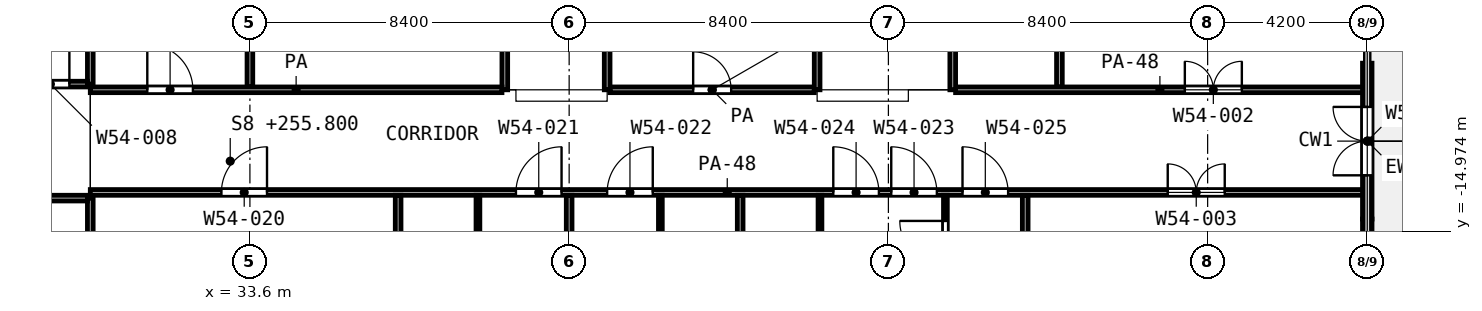
"""IFC4 building model, lengths in metres.
Left out: names, types, materials, properties, quantities, classifications, styles, units other than length and angle.
Written with IfcOpenShell. Run it as: python <this file> out.ifc"""

import sys

from ifc_helpers import new_model, si_unit, direction, frame, frame_2d, origin, place, context, subcontext, project, spatial, rectangle, extrude, element, fill, save


model = new_model("IFC4")
c1 = context("Model", 3, precision=1e-05, world=origin(), true_north=direction((0.0, 1.0)))
c2 = subcontext(c1, "Body", "Model", "MODEL_VIEW")
j1 = project(units=[si_unit("LENGTHUNIT", "METRE"), si_unit("PLANEANGLEUNIT", "RADIAN")], contexts=[c1])
p1 = place(None, origin())
s1 = spatial("IfcSite", under=j1, at=p1, CompositionType="ELEMENT")
p2 = place(p1, origin())
s2 = spatial("IfcBuilding", under=s1, at=p2, CompositionType="ELEMENT")
p3 = place(p2, frame((0.0, 0.0, 255.8)))
s3 = spatial("IfcBuildingStorey", under=s2, at=p3, CompositionType="ELEMENT", Elevation=255.8)
p4 = place(p3, frame((63.0, -18.75, 0.0), z_axis=(0.0, 0.0, 1.0), x_axis=(0.0, 1.0, 0.0)))
e1 = element("IfcWall", 1, at=p4, inside=s3, PredefinedType="SOLIDWALL", context=c2, shape_type="SweptSolid", body=[
    extrude(rectangle(XDim=4.1, YDim=0.25, at=frame_2d((2.05, 0.0))), origin(), (0.0, 0.0, 1.0), 2.58),
])
p5 = place(p4, frame((1.15, 0.0, 0.0)))
e2 = element("IfcOpeningElement", 2, at=p5, cuts=e1, PredefinedType="OPENING", context=c2, shape_type="SweptSolid", body=[
    extrude(rectangle(XDim=1.8, YDim=2.1, at=frame_2d((0.9, 1.05))), frame((0.0, 0.135, 0.0), z_axis=(0.0, -1.0, 0.0), x_axis=(1.0, 0.0, 0.0)), (0.0, 0.0, 1.0), 0.27),
])
p6 = place(p3, frame((63.0, -14.65, 0.0), z_axis=(0.0, 0.0, 1.0), x_axis=(0.0, 1.0, 0.0)))
e3 = element("IfcWall", 3, at=p6, inside=s3, PredefinedType="SOLIDWALL", context=c2, shape_type="SweptSolid", body=[
    extrude(rectangle(XDim=4.1, YDim=0.25, at=frame_2d((2.05, 0.0))), origin(), (0.0, 0.0, 1.0), 2.58),
])
p7 = place(p6, frame((1.15, 0.0, 0.0)))
e4 = element("IfcOpeningElement", 4, at=p7, cuts=e3, PredefinedType="OPENING", context=c2, shape_type="SweptSolid", body=[
    extrude(rectangle(XDim=1.8, YDim=2.1, at=frame_2d((0.9, 1.05))), frame((0.0, 0.135, 0.0), z_axis=(0.0, -1.0, 0.0), x_axis=(1.0, 0.0, 0.0)), (0.0, 0.0, 1.0), 0.27),
])
for number, where, z_axis, x_axis in (
    (5, (39.6, -16.65, 0.0), (0.0, 0.0, 1.0), (0.0, 1.0, 0.0)),
    (6, (44.4, -16.65, 0.0), (0.0, 0.0, 1.0), (0.0, 1.0, 0.0)),
    (7, (48.6, -16.65, 0.0), (0.0, 0.0, 1.0), (0.0, 1.0, 0.0)),
):
    element("IfcWall", number, at=place(p3, frame(where, z_axis=z_axis, x_axis=x_axis)), inside=s3, PredefinedType="PARTITIONING", context=c2, shape_type="SweptSolid", body=[
        extrude(rectangle(XDim=2.625, YDim=0.1, at=frame_2d((1.312, 0.0))), origin(), (0.0, 0.0, 1.0), 3.6),
    ])
p8 = place(p3, frame((51.9, -16.65, 0.0), z_axis=(0.0, 0.0, 1.0), x_axis=(0.0, 1.0, 0.0)))
e8 = element("IfcWall", 8, at=p8, inside=s3, PredefinedType="PARTITIONING", context=c2, shape_type="SweptSolid", body=[
    extrude(rectangle(XDim=2.625, YDim=0.1, at=frame_2d((1.312, 0.0))), origin(), (0.0, 0.0, 1.0), 3.6),
])
p9 = place(p8, frame((0.75, 0.0, 0.0)))
e9 = element("IfcOpeningElement", 9, at=p9, cuts=e8, PredefinedType="OPENING", context=c2, shape_type="SweptSolid", body=[
    extrude(rectangle(XDim=1.2, YDim=2.1, at=frame_2d((0.6, 1.05))), frame((0.0, 0.06, 0.0), z_axis=(0.0, -1.0, 0.0), x_axis=(1.0, 0.0, 0.0)), (0.0, 0.0, 1.0), 0.12),
])
p10 = place(p3, frame((24.8, -14.1, 0.0), z_axis=(0.0, 0.0, 1.0), x_axis=(1.0, 0.0, 0.0)))
e10 = element("IfcWall", 10, at=p10, inside=s3, PredefinedType="PARTITIONING", context=c2, shape_type="SweptSolid", body=[
    extrude(rectangle(XDim=4.525, YDim=0.15, at=frame_2d((2.262, 0.0))), origin(), (0.0, 0.0, 1.0), 3.6),
])
p11 = place(p10, frame((1.75, 0.0, 0.0)))
e11 = element("IfcOpeningElement", 11, at=p11, cuts=e10, PredefinedType="OPENING", context=c2, shape_type="SweptSolid", body=[
    extrude(rectangle(XDim=1.5, YDim=2.1, at=frame_2d((0.75, 1.05))), frame((0.0, 0.085, 0.0), z_axis=(0.0, -1.0, 0.0), x_axis=(1.0, 0.0, 0.0)), (0.0, 0.0, 1.0), 0.17),
])
p12 = place(p3, frame((29.4, -13.95, 0.0), z_axis=(0.0, 0.0, 1.0), x_axis=(1.0, 0.0, 0.0)))
e12 = element("IfcWall", 12, at=p12, inside=s3, PredefinedType="PARTITIONING", context=c2, shape_type="SweptSolid", body=[
    extrude(rectangle(XDim=33.52, YDim=0.15, at=frame_2d((16.76, 0.0))), origin(), (0.0, 0.0, 1.0), 2.7),
])
p13 = place(p12, frame((3.45, 0.0, 0.0)))
e13 = element("IfcOpeningElement", 13, at=p13, cuts=e12, PredefinedType="OPENING", context=c2, shape_type="SweptSolid", body=[
    extrude(rectangle(XDim=1.2, YDim=2.1, at=frame_2d((0.6, 1.05))), frame((0.0, 0.085, 0.0), z_axis=(0.0, -1.0, 0.0), x_axis=(1.0, 0.0, 0.0)), (0.0, 0.0, 1.0), 0.17),
])
p14 = place(p12, frame((11.2, 0.0, 0.0)))
e14 = element("IfcOpeningElement", 14, at=p14, cuts=e12, PredefinedType="OPENING", context=c2, shape_type="SweptSolid", body=[
    extrude(rectangle(XDim=1.2, YDim=2.1, at=frame_2d((0.6, 1.05))), frame((0.0, 0.085, 0.0), z_axis=(0.0, -1.0, 0.0), x_axis=(1.0, 0.0, 0.0)), (0.0, 0.0, 1.0), 0.17),
])
p15 = place(p12, frame((13.6, 0.0, 0.0)))
e15 = element("IfcOpeningElement", 15, at=p15, cuts=e12, PredefinedType="OPENING", context=c2, shape_type="SweptSolid", body=[
    extrude(rectangle(XDim=1.2, YDim=2.1, at=frame_2d((0.6, 1.05))), frame((0.0, 0.085, 0.0), z_axis=(0.0, -1.0, 0.0), x_axis=(1.0, 0.0, 0.0)), (0.0, 0.0, 1.0), 0.17),
])
p16 = place(p12, frame((21.075, 0.0, 0.0)))
e16 = element("IfcOpeningElement", 16, at=p16, cuts=e12, PredefinedType="OPENING", context=c2, shape_type="SweptSolid", body=[
    extrude(rectangle(XDim=1.2, YDim=2.1, at=frame_2d((0.6, 1.05))), frame((0.0, 0.085, 0.0), z_axis=(0.0, -1.0, 0.0), x_axis=(1.0, 0.0, 0.0)), (0.0, 0.0, 1.0), 0.17),
])
p17 = place(p12, frame((19.55, 0.0, 0.0)))
e17 = element("IfcOpeningElement", 17, at=p17, cuts=e12, PredefinedType="OPENING", context=c2, shape_type="SweptSolid", body=[
    extrude(rectangle(XDim=1.2, YDim=2.1, at=frame_2d((0.6, 1.05))), frame((0.0, 0.085, 0.0), z_axis=(0.0, -1.0, 0.0), x_axis=(1.0, 0.0, 0.0)), (0.0, 0.0, 1.0), 0.17),
])
p18 = place(p12, frame((22.95, 0.0, 0.0)))
e18 = element("IfcOpeningElement", 18, at=p18, cuts=e12, PredefinedType="OPENING", context=c2, shape_type="SweptSolid", body=[
    extrude(rectangle(XDim=1.2, YDim=2.1, at=frame_2d((0.6, 1.05))), frame((0.0, 0.085, 0.0), z_axis=(0.0, -1.0, 0.0), x_axis=(1.0, 0.0, 0.0)), (0.0, 0.0, 1.0), 0.17),
])
p19 = place(p12, frame((28.35, 0.0, 0.0)))
e19 = element("IfcOpeningElement", 19, at=p19, cuts=e12, PredefinedType="OPENING", context=c2, shape_type="SweptSolid", body=[
    extrude(rectangle(XDim=1.5, YDim=2.1, at=frame_2d((0.75, 1.05))), frame((0.0, 0.085, 0.0), z_axis=(0.0, -1.0, 0.0), x_axis=(1.0, 0.0, 0.0)), (0.0, 0.0, 1.0), 0.17),
])
p20 = place(p3, frame((29.4, -11.25, 0.0), z_axis=(0.0, 0.0, 1.0), x_axis=(1.0, 0.0, 0.0)))
e20 = element("IfcWall", 20, at=p20, inside=s3, PredefinedType="PARTITIONING", context=c2, shape_type="SweptSolid", body=[
    extrude(rectangle(XDim=10.832, YDim=0.15, at=frame_2d((5.416, 0.0))), origin(), (0.0, 0.0, 1.0), 3.6),
])
p21 = place(p20, frame((1.5, 0.0, 0.0)))
e21 = element("IfcOpeningElement", 21, at=p21, cuts=e20, PredefinedType="OPENING", context=c2, shape_type="SweptSolid", body=[
    extrude(rectangle(XDim=1.2, YDim=2.1, at=frame_2d((0.6, 1.05))), frame((0.0, 0.085, 0.0), z_axis=(0.0, -1.0, 0.0), x_axis=(1.0, 0.0, 0.0)), (0.0, 0.0, 1.0), 0.17),
])
p22 = place(p3, frame((43.075, -11.25, 0.0), z_axis=(0.0, 0.0, 1.0), x_axis=(1.0, 0.0, 0.0)))
e22 = element("IfcWall", 22, at=p22, inside=s3, PredefinedType="PARTITIONING", context=c2, shape_type="SweptSolid", body=[
    extrude(rectangle(XDim=5.375, YDim=0.15, at=frame_2d((2.688, 0.0))), origin(), (0.0, 0.0, 1.0), 3.6),
])
p23 = place(p22, frame((2.188, 0.0, 0.0)))
e23 = element("IfcOpeningElement", 23, at=p23, cuts=e22, PredefinedType="OPENING", context=c2, shape_type="SweptSolid", body=[
    extrude(rectangle(XDim=1.0, YDim=2.1, at=frame_2d((0.5, 1.05))), frame((0.0, 0.085, 0.0), z_axis=(0.0, -1.0, 0.0), x_axis=(1.0, 0.0, 0.0)), (0.0, 0.0, 1.0), 0.17),
])
p24 = place(p3, frame((52.168, -11.25, 0.0), z_axis=(0.0, 0.0, 1.0), x_axis=(1.0, 0.0, 0.0)))
e24 = element("IfcWall", 24, at=p24, inside=s3, PredefinedType="PARTITIONING", context=c2, shape_type="SweptSolid", body=[
    extrude(rectangle(XDim=10.752, YDim=0.15, at=frame_2d((5.376, 0.0))), origin(), (0.0, 0.0, 1.0), 2.7),
])
p25 = place(p24, frame((6.032, 0.0, 0.0)))
e25 = element("IfcOpeningElement", 25, at=p25, cuts=e24, PredefinedType="OPENING", context=c2, shape_type="SweptSolid", body=[
    extrude(rectangle(XDim=1.5, YDim=2.1, at=frame_2d((0.75, 1.05))), frame((0.0, 0.085, 0.0), z_axis=(0.0, -1.0, 0.0), x_axis=(1.0, 0.0, 0.0)), (0.0, 0.0, 1.0), 0.17),
])
p26 = place(p3, frame((24.8, -11.1, 0.0), z_axis=(0.0, 0.0, 1.0), x_axis=(1.0, 0.0, 0.0)))
e26 = element("IfcWall", 26, at=p26, inside=s3, PredefinedType="PARTITIONING", context=c2, shape_type="SweptSolid", body=[
    extrude(rectangle(XDim=4.525, YDim=0.15, at=frame_2d((2.262, 0.0))), origin(), (0.0, 0.0, 1.0), 3.6),
])
p27 = place(p26, frame((1.0, 0.0, 0.0)))
e27 = element("IfcOpeningElement", 27, at=p27, cuts=e26, PredefinedType="OPENING", context=c2, shape_type="SweptSolid", body=[
    extrude(rectangle(XDim=0.9, YDim=2.1, at=frame_2d((0.45, 1.05))), frame((0.0, 0.085, 0.0), z_axis=(0.0, -1.0, 0.0), x_axis=(1.0, 0.0, 0.0)), (0.0, 0.0, 1.0), 0.17),
])
p28 = place(p26, frame((3.05, 0.0, 0.0)))
e28 = element("IfcOpeningElement", 28, at=p28, cuts=e26, PredefinedType="OPENING", context=c2, shape_type="SweptSolid", body=[
    extrude(rectangle(XDim=1.0, YDim=2.1, at=frame_2d((0.5, 1.05))), frame((0.0, 0.085, 0.0), z_axis=(0.0, -1.0, 0.0), x_axis=(1.0, 0.0, 0.0)), (0.0, 0.0, 1.0), 0.17),
])
p29 = place(p3, frame((29.4, -25.2, 0.0), z_axis=(0.0, 0.0, 1.0), x_axis=(0.0, 1.0, 0.0)))
e29 = element("IfcWall", 29, at=p29, inside=s3, PredefinedType="PARTITIONING", context=c2, shape_type="SweptSolid", body=[
    extrude(rectangle(XDim=11.1, YDim=0.15, at=frame_2d((5.55, 0.0))), origin(), (0.0, 0.0, 1.0), 3.6),
])
p30 = place(p3, frame((29.4, -11.1, 0.0), z_axis=(0.0, 0.0, 1.0), x_axis=(0.0, 1.0, 0.0)))
e30 = element("IfcWall", 30, at=p30, inside=s3, PredefinedType="PARTITIONING", context=c2, shape_type="SweptSolid", body=[
    extrude(rectangle(XDim=11.02, YDim=0.15, at=frame_2d((5.51, 0.0))), origin(), (0.0, 0.0, 1.0), 3.6),
])
p31 = place(p3, frame((33.6, -11.175, 0.0), z_axis=(0.0, 0.0, 1.0), x_axis=(0.0, 1.0, 0.0)))
e31 = element("IfcWall", 31, at=p31, inside=s3, PredefinedType="PARTITIONING", context=c2, shape_type="SweptSolid", body=[
    extrude(rectangle(XDim=11.095, YDim=0.15, at=frame_2d((5.547, 0.0))), origin(), (0.0, 0.0, 1.0), 3.6),
])
p32 = place(p3, frame((37.5, -25.12, 0.0), z_axis=(0.0, 0.0, 1.0), x_axis=(0.0, 1.0, 0.0)))
e32 = element("IfcWall", 32, at=p32, inside=s3, PredefinedType="PARTITIONING", context=c2, shape_type="SweptSolid", body=[
    extrude(rectangle(XDim=11.095, YDim=0.15, at=frame_2d((5.548, 0.0))), origin(), (0.0, 0.0, 1.0), 3.6),
])
p33 = place(p3, frame((40.307, -11.25, 0.0), z_axis=(0.0, 0.0, 1.0), x_axis=(0.0, 1.0, 0.0)))
e33 = element("IfcWall", 33, at=p33, inside=s3, PredefinedType="PARTITIONING", context=c2, shape_type="SweptSolid", body=[
    extrude(rectangle(XDim=11.17, YDim=0.15, at=frame_2d((5.585, 0.0))), origin(), (0.0, 0.0, 1.0), 3.6),
])
p34 = place(p33, frame((4.95, 0.0, 0.0)))
e34 = element("IfcOpeningElement", 34, at=p34, cuts=e33, PredefinedType="OPENING", context=c2, shape_type="SweptSolid", body=[
    extrude(rectangle(XDim=1.0, YDim=2.1, at=frame_2d((0.5, 1.05))), frame((0.0, 0.085, 0.0), z_axis=(0.0, -1.0, 0.0), x_axis=(1.0, 0.0, 0.0)), (0.0, 0.0, 1.0), 0.17),
])
p35 = place(p3, frame((42.0, -25.12, 0.0), z_axis=(0.0, 0.0, 1.0), x_axis=(0.0, 1.0, 0.0)))
e35 = element("IfcWall", 35, at=p35, inside=s3, PredefinedType="PARTITIONING", context=c2, shape_type="SweptSolid", body=[
    extrude(rectangle(XDim=11.095, YDim=0.15, at=frame_2d((5.548, 0.0))), origin(), (0.0, 0.0, 1.0), 3.6),
])
p36 = place(p3, frame((43.0, -11.25, 0.0), z_axis=(0.0, 0.0, 1.0), x_axis=(0.0, 1.0, 0.0)))
e36 = element("IfcWall", 36, at=p36, inside=s3, PredefinedType="PARTITIONING", context=c2, shape_type="SweptSolid", body=[
    extrude(rectangle(XDim=2.398, YDim=0.15, at=frame_2d((1.199, 0.0))), origin(), (0.0, 0.0, 1.0), 3.6),
])
p37 = place(p3, frame((46.5, -25.12, 0.0), z_axis=(0.0, 0.0, 1.0), x_axis=(0.0, 1.0, 0.0)))
e37 = element("IfcWall", 37, at=p37, inside=s3, PredefinedType="PARTITIONING", context=c2, shape_type="SweptSolid", body=[
    extrude(rectangle(XDim=11.095, YDim=0.15, at=frame_2d((5.548, 0.0))), origin(), (0.0, 0.0, 1.0), 3.6),
])
p38 = place(p3, frame((48.525, -11.25, 0.0), z_axis=(0.0, 0.0, 1.0), x_axis=(0.0, 1.0, 0.0)))
e38 = element("IfcWall", 38, at=p38, inside=s3, PredefinedType="PARTITIONING", context=c2, shape_type="SweptSolid", body=[
    extrude(rectangle(XDim=2.6, YDim=0.15, at=frame_2d((1.3, 0.0))), origin(), (0.0, 0.0, 1.0), 3.6),
])
p39 = place(p3, frame((52.093, -11.25, 0.0), z_axis=(0.0, 0.0, 1.0), x_axis=(0.0, 1.0, 0.0)))
e39 = element("IfcWall", 39, at=p39, inside=s3, PredefinedType="PARTITIONING", context=c2, shape_type="SweptSolid", body=[
    extrude(rectangle(XDim=9.398, YDim=0.15, at=frame_2d((4.699, 0.0))), origin(), (0.0, 0.0, 1.0), 3.6),
])
p40 = place(p39, frame((4.199, 0.0, 0.0)))
e40 = element("IfcOpeningElement", 40, at=p40, cuts=e39, PredefinedType="OPENING", context=c2, shape_type="SweptSolid", body=[
    extrude(rectangle(XDim=1.0, YDim=2.1, at=frame_2d((0.5, 1.05))), frame((0.0, 0.085, 0.0), z_axis=(0.0, -1.0, 0.0), x_axis=(1.0, 0.0, 0.0)), (0.0, 0.0, 1.0), 0.17),
])
p41 = place(p3, frame((54.0, -25.12, 0.0), z_axis=(0.0, 0.0, 1.0), x_axis=(0.0, 1.0, 0.0)))
e41 = element("IfcWall", 41, at=p41, inside=s3, PredefinedType="PARTITIONING", context=c2, shape_type="SweptSolid", body=[
    extrude(rectangle(XDim=11.095, YDim=0.15, at=frame_2d((5.548, 0.0))), origin(), (0.0, 0.0, 1.0), 3.6),
])
p42 = place(p3, frame((54.9, -11.175, 0.0), z_axis=(0.0, 0.0, 1.0), x_axis=(0.0, 1.0, 0.0)))
e42 = element("IfcWall", 42, at=p42, inside=s3, PredefinedType="PARTITIONING", context=c2, shape_type="SweptSolid", body=[
    extrude(rectangle(XDim=11.095, YDim=0.15, at=frame_2d((5.547, 0.0))), origin(), (0.0, 0.0, 1.0), 3.6),
])
p43 = place(p7, origin())
e43 = element("IfcDoor", 43, at=p43, inside=s3, OperationType="DOUBLE_DOOR_SINGLE_SWING", PredefinedType="DOOR", context=c2, shape_type="SweptSolid", body=[
    extrude(rectangle(XDim=1.8, YDim=2.1, at=frame_2d((0.9, 1.05))), frame((0.0, 0.025, 0.0), z_axis=(0.0, -1.0, 0.0), x_axis=(1.0, 0.0, 0.0)), (0.0, 0.0, 1.0), 0.05),
])
fill(e4, e43)
p44 = place(p23, origin())
e44 = element("IfcDoor", 44, at=p44, inside=s3, OperationType="SINGLE_SWING_LEFT", PredefinedType="DOOR", context=c2, shape_type="SweptSolid", body=[
    extrude(rectangle(XDim=1.0, YDim=2.1, at=frame_2d((0.5, 1.05))), frame((0.0, 0.025, 0.0), z_axis=(0.0, -1.0, 0.0), x_axis=(1.0, 0.0, 0.0)), (0.0, 0.0, 1.0), 0.05),
])
fill(e23, e44)
p45 = place(p25, origin())
e45 = element("IfcDoor", 45, at=p45, inside=s3, OperationType="DOUBLE_DOOR_SINGLE_SWING", PredefinedType="DOOR", context=c2, shape_type="SweptSolid", body=[
    extrude(rectangle(XDim=1.5, YDim=2.1, at=frame_2d((0.75, 1.05))), frame((0.0, 0.025, 0.0), z_axis=(0.0, -1.0, 0.0), x_axis=(1.0, 0.0, 0.0)), (0.0, 0.0, 1.0), 0.05),
])
fill(e25, e45)
p46 = place(p13, origin())
e46 = element("IfcDoor", 46, at=p46, inside=s3, OperationType="SINGLE_SWING_RIGHT", PredefinedType="DOOR", context=c2, shape_type="SweptSolid", body=[
    extrude(rectangle(XDim=1.2, YDim=2.1, at=frame_2d((0.6, 1.05))), frame((0.0, 0.025, 0.0), z_axis=(0.0, -1.0, 0.0), x_axis=(1.0, 0.0, 0.0)), (0.0, 0.0, 1.0), 0.05),
])
fill(e13, e46)
p47 = place(p14, origin())
e47 = element("IfcDoor", 47, at=p47, inside=s3, OperationType="SINGLE_SWING_RIGHT", PredefinedType="DOOR", context=c2, shape_type="SweptSolid", body=[
    extrude(rectangle(XDim=1.2, YDim=2.1, at=frame_2d((0.6, 1.05))), frame((0.0, 0.025, 0.0), z_axis=(0.0, -1.0, 0.0), x_axis=(1.0, 0.0, 0.0)), (0.0, 0.0, 1.0), 0.05),
])
fill(e14, e47)
p48 = place(p15, origin())
e48 = element("IfcDoor", 48, at=p48, inside=s3, OperationType="SINGLE_SWING_RIGHT", PredefinedType="DOOR", context=c2, shape_type="SweptSolid", body=[
    extrude(rectangle(XDim=1.2, YDim=2.1, at=frame_2d((0.6, 1.05))), frame((0.0, 0.025, 0.0), z_axis=(0.0, -1.0, 0.0), x_axis=(1.0, 0.0, 0.0)), (0.0, 0.0, 1.0), 0.05),
])
fill(e15, e48)
p49 = place(p16, origin())
e49 = element("IfcDoor", 49, at=p49, inside=s3, OperationType="SINGLE_SWING_LEFT", PredefinedType="DOOR", context=c2, shape_type="SweptSolid", body=[
    extrude(rectangle(XDim=1.2, YDim=2.1, at=frame_2d((0.6, 1.05))), frame((0.0, 0.025, 0.0), z_axis=(0.0, -1.0, 0.0), x_axis=(1.0, 0.0, 0.0)), (0.0, 0.0, 1.0), 0.05),
])
fill(e16, e49)
p50 = place(p17, origin())
e50 = element("IfcDoor", 50, at=p50, inside=s3, OperationType="SINGLE_SWING_LEFT", PredefinedType="DOOR", context=c2, shape_type="SweptSolid", body=[
    extrude(rectangle(XDim=1.2, YDim=2.1, at=frame_2d((0.6, 1.05))), frame((0.0, 0.025, 0.0), z_axis=(0.0, -1.0, 0.0), x_axis=(1.0, 0.0, 0.0)), (0.0, 0.0, 1.0), 0.05),
])
fill(e17, e50)
p51 = place(p18, origin())
e51 = element("IfcDoor", 51, at=p51, inside=s3, OperationType="SINGLE_SWING_LEFT", PredefinedType="DOOR", context=c2, shape_type="SweptSolid", body=[
    extrude(rectangle(XDim=1.2, YDim=2.1, at=frame_2d((0.6, 1.05))), frame((0.0, 0.025, 0.0), z_axis=(0.0, -1.0, 0.0), x_axis=(1.0, 0.0, 0.0)), (0.0, 0.0, 1.0), 0.05),
])
fill(e18, e51)
p52 = place(p9, origin())
e52 = element("IfcDoor", 52, at=p52, inside=s3, OperationType="SINGLE_SWING_RIGHT", PredefinedType="DOOR", context=c2, shape_type="SweptSolid", body=[
    extrude(rectangle(XDim=1.2, YDim=2.1, at=frame_2d((0.6, 1.05))), frame((0.0, 0.025, 0.0), z_axis=(0.0, -1.0, 0.0), x_axis=(1.0, 0.0, 0.0)), (0.0, 0.0, 1.0), 0.05),
])
fill(e9, e52)
p53 = place(p19, origin())
e53 = element("IfcDoor", 53, at=p53, inside=s3, OperationType="DOUBLE_DOOR_SINGLE_SWING", PredefinedType="DOOR", context=c2, shape_type="SweptSolid", body=[
    extrude(rectangle(XDim=1.5, YDim=2.1, at=frame_2d((0.75, 1.05))), frame((0.0, 0.025, 0.0), z_axis=(0.0, -1.0, 0.0), x_axis=(1.0, 0.0, 0.0)), (0.0, 0.0, 1.0), 0.05),
])
fill(e19, e53)
p54 = place(p28, origin())
e54 = element("IfcDoor", 54, at=p54, inside=s3, OperationType="SINGLE_SWING_RIGHT", PredefinedType="DOOR", context=c2, shape_type="SweptSolid", body=[
    extrude(rectangle(XDim=1.0, YDim=2.1, at=frame_2d((0.5, 1.05))), frame((0.0, 0.025, 0.0), z_axis=(0.0, -1.0, 0.0), x_axis=(1.0, 0.0, 0.0)), (0.0, 0.0, 1.0), 0.05),
])
fill(e28, e54)
p55 = place(p21, origin())
e55 = element("IfcDoor", 55, at=p55, inside=s3, OperationType="SINGLE_SWING_LEFT", PredefinedType="DOOR", context=c2, shape_type="SweptSolid", body=[
    extrude(rectangle(XDim=1.2, YDim=2.1, at=frame_2d((0.6, 1.05))), frame((0.0, 0.025, 0.0), z_axis=(0.0, -1.0, 0.0), x_axis=(1.0, 0.0, 0.0)), (0.0, 0.0, 1.0), 0.05),
])
fill(e21, e55)
save(model, sys.argv[1])
